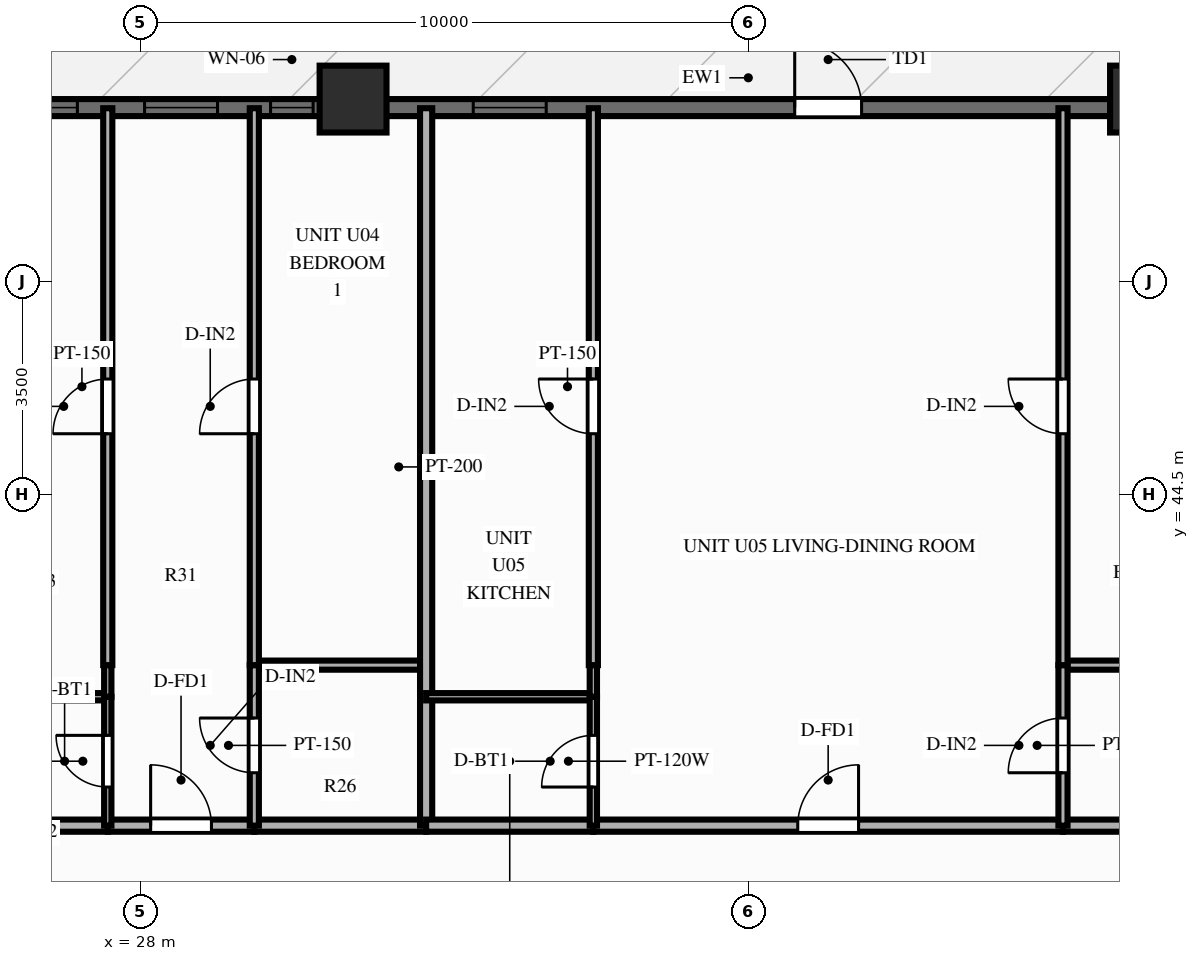
"""IFC4 building model, lengths in metres.
Left out: names, types, materials, properties, quantities, classifications, styles, units other than length and angle.
Written with IfcOpenShell. Run it as: python <this file> out.ifc"""

import sys

from ifc_helpers import new_model, si_unit, direction, frame, frame_2d, origin, origin_2d, place, context, subcontext, project, spatial, rectangle, extrude, source, transform, mapped, element, fill, save


model = new_model("IFC4")
c1 = context("Model", 3, precision=1e-05, world=origin(), true_north=direction((0.0, 1.0)))
c2 = subcontext(c1, "Body", "Model", "MODEL_VIEW")
j1 = project(units=[si_unit("LENGTHUNIT", "METRE"), si_unit("PLANEANGLEUNIT", "RADIAN")], contexts=[c1])
p1 = place(None, origin())
s1 = spatial("IfcSite", under=j1, at=p1, CompositionType="ELEMENT")
p2 = place(p1, origin())
s2 = spatial("IfcBuilding", under=s1, at=p2, CompositionType="ELEMENT")
p3 = place(p2, frame((0.0, 0.0, 46.4)))
s3 = spatial("IfcBuildingStorey", under=s2, at=p3, CompositionType="ELEMENT", Elevation=46.4)
m1 = source(origin(), c2, "Body", "SweptSolid", [
    extrude(rectangle(XDim=1.1, YDim=1.1, at=origin_2d()), origin(), (0.0, 0.0, 1.0), 3.0),
])
for number, where, z_axis, x_axis in (
    (1, (44.5, 51.0, 0.0), (0.0, 0.0, 1.0), (1.0, 0.0, 0.0)),
    (2, (31.5, 51.0, 0.0), (0.0, 0.0, 1.0), (1.0, 0.0, 0.0)),
):
    element("IfcColumn", number, at=place(p3, frame(where, z_axis=z_axis, x_axis=x_axis)), inside=s3, PredefinedType="COLUMN", context=c2, shape_type="MappedRepresentation", body=[
        mapped(m1, transform((0.0, 0.0, 0.0), scale=1.0)),
    ])
p4 = place(p3, frame((15.5, 50.86, 0.0), z_axis=(0.0, 0.0, 1.0), x_axis=(1.0, 0.0, 0.0)))
e3 = element("IfcWall", 3, at=p4, inside=s3, PredefinedType="SOLIDWALL", context=c2, shape_type="SweptSolid", body=[
    extrude(rectangle(XDim=45.0, YDim=0.28, at=frame_2d((22.5, 0.0))), origin(), (0.0, 0.0, 1.0), 2.28),
])
p5 = place(p4, frame((0.76, 0.0, 0.25)))
e4 = element("IfcOpeningElement", 4, at=p5, cuts=e3, PredefinedType="OPENING", context=c2, shape_type="SweptSolid", body=[
    extrude(rectangle(XDim=1.2, YDim=1.5, at=frame_2d((0.6, 0.75))), frame((0.0, 0.152, 0.0), z_axis=(0.0, -1.0, 0.0), x_axis=(1.0, 0.0, 0.0)), (0.0, 0.0, 1.0), 0.304),
])
p6 = place(p4, frame((2.83, 0.0, 0.25)))
e5 = element("IfcOpeningElement", 5, at=p6, cuts=e3, PredefinedType="OPENING", context=c2, shape_type="SweptSolid", body=[
    extrude(rectangle(XDim=1.2, YDim=1.5, at=frame_2d((0.6, 0.75))), frame((0.0, 0.152, 0.0), z_axis=(0.0, -1.0, 0.0), x_axis=(1.0, 0.0, 0.0)), (0.0, 0.0, 1.0), 0.304),
])
p7 = place(p4, frame((5.135, 0.0, 0.25)))
e6 = element("IfcOpeningElement", 6, at=p7, cuts=e3, PredefinedType="OPENING", context=c2, shape_type="SweptSolid", body=[
    extrude(rectangle(XDim=1.2, YDim=1.5, at=frame_2d((0.6, 0.75))), frame((0.0, 0.152, 0.0), z_axis=(0.0, -1.0, 0.0), x_axis=(1.0, 0.0, 0.0)), (0.0, 0.0, 1.0), 0.304),
])
p8 = place(p4, frame((7.753, 0.0, 0.25)))
e7 = element("IfcOpeningElement", 7, at=p8, cuts=e3, PredefinedType="OPENING", context=c2, shape_type="SweptSolid", body=[
    extrude(rectangle(XDim=1.2, YDim=1.5, at=frame_2d((0.6, 0.75))), frame((0.0, 0.152, 0.0), z_axis=(0.0, -1.0, 0.0), x_axis=(1.0, 0.0, 0.0)), (0.0, 0.0, 1.0), 0.304),
])
p9 = place(p4, frame((10.266, 0.0, 0.25)))
e8 = element("IfcOpeningElement", 8, at=p9, cuts=e3, PredefinedType="OPENING", context=c2, shape_type="SweptSolid", body=[
    extrude(rectangle(XDim=1.2, YDim=1.5, at=frame_2d((0.6, 0.75))), frame((0.0, 0.152, 0.0), z_axis=(0.0, -1.0, 0.0), x_axis=(1.0, 0.0, 0.0)), (0.0, 0.0, 1.0), 0.304),
])
p10 = place(p4, frame((12.571, 0.0, 0.25)))
e9 = element("IfcOpeningElement", 9, at=p10, cuts=e3, PredefinedType="OPENING", context=c2, shape_type="SweptSolid", body=[
    extrude(rectangle(XDim=1.2, YDim=1.5, at=frame_2d((0.6, 0.75))), frame((0.0, 0.152, 0.0), z_axis=(0.0, -1.0, 0.0), x_axis=(1.0, 0.0, 0.0)), (0.0, 0.0, 1.0), 0.304),
])
p11 = place(p4, frame((14.643, 0.0, 0.25)))
e10 = element("IfcOpeningElement", 10, at=p11, cuts=e3, PredefinedType="OPENING", context=c2, shape_type="SweptSolid", body=[
    extrude(rectangle(XDim=0.7, YDim=1.5, at=frame_2d((0.35, 0.75))), frame((0.0, 0.152, 0.0), z_axis=(0.0, -1.0, 0.0), x_axis=(1.0, 0.0, 0.0)), (0.0, 0.0, 1.0), 0.304),
])
p12 = place(p4, frame((17.977, 0.0, 0.25)))
e11 = element("IfcOpeningElement", 11, at=p12, cuts=e3, PredefinedType="OPENING", context=c2, shape_type="SweptSolid", body=[
    extrude(rectangle(XDim=1.2, YDim=1.5, at=frame_2d((0.6, 0.75))), frame((0.0, 0.152, 0.0), z_axis=(0.0, -1.0, 0.0), x_axis=(1.0, 0.0, 0.0)), (0.0, 0.0, 1.0), 0.304),
])
p13 = place(p4, frame((23.263, 0.0, 0.0)))
e12 = element("IfcOpeningElement", 12, at=p13, cuts=e3, PredefinedType="OPENING", context=c2, shape_type="SweptSolid", body=[
    extrude(rectangle(XDim=1.1, YDim=2.15, at=frame_2d((0.55, 1.075))), frame((0.0, 0.152, 0.0), z_axis=(0.0, -1.0, 0.0), x_axis=(1.0, 0.0, 0.0)), (0.0, 0.0, 1.0), 0.304),
])
p14 = place(p4, frame((29.832, 0.0, 0.25)))
e13 = element("IfcOpeningElement", 13, at=p14, cuts=e3, PredefinedType="OPENING", context=c2, shape_type="SweptSolid", body=[
    extrude(rectangle(XDim=0.95, YDim=1.5, at=frame_2d((0.475, 0.75))), frame((0.0, 0.152, 0.0), z_axis=(0.0, -1.0, 0.0), x_axis=(1.0, 0.0, 0.0)), (0.0, 0.0, 1.0), 0.304),
])
p15 = place(p4, frame((31.998, 0.0, 0.25)))
e14 = element("IfcOpeningElement", 14, at=p15, cuts=e3, PredefinedType="OPENING", context=c2, shape_type="SweptSolid", body=[
    extrude(rectangle(XDim=1.2, YDim=1.5, at=frame_2d((0.6, 0.75))), frame((0.0, 0.152, 0.0), z_axis=(0.0, -1.0, 0.0), x_axis=(1.0, 0.0, 0.0)), (0.0, 0.0, 1.0), 0.304),
])
p16 = place(p4, frame((37.023, 0.0, 0.25)))
e15 = element("IfcOpeningElement", 15, at=p16, cuts=e3, PredefinedType="OPENING", context=c2, shape_type="SweptSolid", body=[
    extrude(rectangle(XDim=1.2, YDim=1.5, at=frame_2d((0.6, 0.75))), frame((0.0, 0.152, 0.0), z_axis=(0.0, -1.0, 0.0), x_axis=(1.0, 0.0, 0.0)), (0.0, 0.0, 1.0), 0.304),
])
p17 = place(p4, frame((42.341, 0.0, 0.25)))
e16 = element("IfcOpeningElement", 16, at=p17, cuts=e3, PredefinedType="OPENING", context=c2, shape_type="SweptSolid", body=[
    extrude(rectangle(XDim=1.2, YDim=1.5, at=frame_2d((0.6, 0.75))), frame((0.0, 0.152, 0.0), z_axis=(0.0, -1.0, 0.0), x_axis=(1.0, 0.0, 0.0)), (0.0, 0.0, 1.0), 0.304),
])
p18 = place(p3, frame((25.266, 39.05, 0.0), z_axis=(0.0, 0.0, 1.0), x_axis=(1.0, 0.0, 0.0)))
e17 = element("IfcWall", 17, at=p18, inside=s3, PredefinedType="PARTITIONING", context=c2, shape_type="SweptSolid", body=[
    extrude(rectangle(XDim=2.2, YDim=0.2, at=frame_2d((1.1, 0.0))), origin(), (0.0, 0.0, 1.0), 2.79),
])
p19 = place(p3, frame((27.466, 39.05, 0.0), z_axis=(0.0, 0.0, 1.0), x_axis=(1.0, 0.0, 0.0)))
e18 = element("IfcWall", 18, at=p19, inside=s3, PredefinedType="PARTITIONING", context=c2, shape_type="SweptSolid", body=[
    extrude(rectangle(XDim=2.41, YDim=0.2, at=frame_2d((1.205, 0.0))), origin(), (0.0, 0.0, 1.0), 2.79),
])
p20 = place(p19, frame((0.705, 0.0, 0.0)))
e19 = element("IfcOpeningElement", 19, at=p20, cuts=e18, PredefinedType="OPENING", context=c2, shape_type="SweptSolid", body=[
    extrude(rectangle(XDim=1.0, YDim=2.15, at=frame_2d((0.5, 1.075))), frame((0.0, 0.112, 0.0), z_axis=(0.0, -1.0, 0.0), x_axis=(1.0, 0.0, 0.0)), (0.0, 0.0, 1.0), 0.224),
])
p21 = place(p3, frame((29.876, 39.05, 0.0), z_axis=(0.0, 0.0, 1.0), x_axis=(1.0, 0.0, 0.0)))
e20 = element("IfcWall", 20, at=p21, inside=s3, PredefinedType="PARTITIONING", context=c2, shape_type="SweptSolid", body=[
    extrude(rectangle(XDim=2.825, YDim=0.2, at=frame_2d((1.413, 0.0))), origin(), (0.0, 0.0, 1.0), 2.79),
])
p22 = place(p3, frame((25.266, 41.17, 0.0), z_axis=(0.0, 0.0, 1.0), x_axis=(1.0, 0.0, 0.0)))
e21 = element("IfcWall", 21, at=p22, inside=s3, PredefinedType="PARTITIONING", context=c2, shape_type="SweptSolid", body=[
    extrude(rectangle(XDim=2.2, YDim=0.12, at=frame_2d((1.1, 0.0))), origin(), (0.0, 0.0, 1.0), 2.79),
])
p23 = place(p3, frame((29.876, 41.69, 0.0), z_axis=(0.0, 0.0, 1.0), x_axis=(1.0, 0.0, 0.0)))
e22 = element("IfcWall", 22, at=p23, inside=s3, PredefinedType="PARTITIONING", context=c2, shape_type="SweptSolid", body=[
    extrude(rectangle(XDim=2.825, YDim=0.15, at=frame_2d((1.413, 0.0))), origin(), (0.0, 0.0, 1.0), 2.79),
])
p24 = place(p3, frame((27.466, 39.05, 0.0), z_axis=(0.0, 0.0, 1.0), x_axis=(0.0, 1.0, 0.0)))
e23 = element("IfcWall", 23, at=p24, inside=s3, PredefinedType="PARTITIONING", context=c2, shape_type="SweptSolid", body=[
    extrude(rectangle(XDim=2.12, YDim=0.12, at=frame_2d((1.06, 0.0))), origin(), (0.0, 0.0, 1.0), 2.79),
])
p25 = place(p24, frame((0.635, 0.0, 0.0)))
e24 = element("IfcOpeningElement", 24, at=p25, cuts=e23, PredefinedType="OPENING", context=c2, shape_type="SweptSolid", body=[
    extrude(rectangle(XDim=0.85, YDim=2.05, at=frame_2d((0.425, 1.025))), frame((0.0, 0.072, 0.0), z_axis=(0.0, -1.0, 0.0), x_axis=(1.0, 0.0, 0.0)), (0.0, 0.0, 1.0), 0.144),
])
p26 = place(p3, frame((27.466, 41.17, 0.0), z_axis=(0.0, 0.0, 1.0), x_axis=(0.0, 1.0, 0.0)))
e25 = element("IfcWall", 25, at=p26, inside=s3, PredefinedType="PARTITIONING", context=c2, shape_type="SweptSolid", body=[
    extrude(rectangle(XDim=0.52, YDim=0.12, at=frame_2d((0.26, 0.0))), origin(), (0.0, 0.0, 1.0), 2.79),
])
p27 = place(p3, frame((27.466, 41.69, 0.0), z_axis=(0.0, 0.0, 1.0), x_axis=(0.0, 1.0, 0.0)))
e26 = element("IfcWall", 26, at=p27, inside=s3, PredefinedType="PARTITIONING", context=c2, shape_type="SweptSolid", body=[
    extrude(rectangle(XDim=9.16, YDim=0.15, at=frame_2d((4.58, 0.0))), origin(), (0.0, 0.0, 1.0), 2.79),
])
p28 = place(p27, frame((3.806, 0.0, 0.0)))
e27 = element("IfcOpeningElement", 27, at=p28, cuts=e26, PredefinedType="OPENING", context=c2, shape_type="SweptSolid", body=[
    extrude(rectangle(XDim=0.9, YDim=2.1, at=frame_2d((0.45, 1.05))), frame((0.0, 0.087, 0.0), z_axis=(0.0, -1.0, 0.0), x_axis=(1.0, 0.0, 0.0)), (0.0, 0.0, 1.0), 0.174),
])
p29 = place(p3, frame((29.876, 39.05, 0.0), z_axis=(0.0, 0.0, 1.0), x_axis=(0.0, 1.0, 0.0)))
e28 = element("IfcWall", 28, at=p29, inside=s3, PredefinedType="PARTITIONING", context=c2, shape_type="SweptSolid", body=[
    extrude(rectangle(XDim=2.64, YDim=0.15, at=frame_2d((1.32, 0.0))), origin(), (0.0, 0.0, 1.0), 2.79),
])
p30 = place(p29, frame((0.87, 0.0, 0.0)))
e29 = element("IfcOpeningElement", 29, at=p30, cuts=e28, PredefinedType="OPENING", context=c2, shape_type="SweptSolid", body=[
    extrude(rectangle(XDim=0.9, YDim=2.1, at=frame_2d((0.45, 1.05))), frame((0.0, 0.087, 0.0), z_axis=(0.0, -1.0, 0.0), x_axis=(1.0, 0.0, 0.0)), (0.0, 0.0, 1.0), 0.174),
])
p31 = place(p3, frame((29.876, 41.69, 0.0), z_axis=(0.0, 0.0, 1.0), x_axis=(0.0, 1.0, 0.0)))
e30 = element("IfcWall", 30, at=p31, inside=s3, PredefinedType="PARTITIONING", context=c2, shape_type="SweptSolid", body=[
    extrude(rectangle(XDim=9.16, YDim=0.15, at=frame_2d((4.58, 0.0))), origin(), (0.0, 0.0, 1.0), 2.79),
])
p32 = place(p31, frame((3.806, 0.0, 0.0)))
e31 = element("IfcOpeningElement", 31, at=p32, cuts=e30, PredefinedType="OPENING", context=c2, shape_type="SweptSolid", body=[
    extrude(rectangle(XDim=0.9, YDim=2.1, at=frame_2d((0.45, 1.05))), frame((0.0, 0.087, 0.0), z_axis=(0.0, -1.0, 0.0), x_axis=(1.0, 0.0, 0.0)), (0.0, 0.0, 1.0), 0.174),
])
p33 = place(p3, frame((32.701, 39.05, 0.0), z_axis=(0.0, 0.0, 1.0), x_axis=(0.0, 1.0, 0.0)))
e32 = element("IfcWall", 32, at=p33, inside=s3, PredefinedType="PARTITIONING", context=c2, shape_type="SweptSolid", body=[
    extrude(rectangle(XDim=11.8, YDim=0.2, at=frame_2d((5.9, 0.0))), origin(), (0.0, 0.0, 1.0), 2.79),
])
p34 = place(p3, frame((32.701, 39.05, 0.0), z_axis=(0.0, 0.0, 1.0), x_axis=(1.0, 0.0, 0.0)))
e33 = element("IfcWall", 33, at=p34, inside=s3, PredefinedType="PARTITIONING", context=c2, shape_type="SweptSolid", body=[
    extrude(rectangle(XDim=2.75, YDim=0.2, at=frame_2d((1.375, 0.0))), origin(), (0.0, 0.0, 1.0), 2.79),
])
p35 = place(p3, frame((35.451, 39.05, 0.0), z_axis=(0.0, 0.0, 1.0), x_axis=(1.0, 0.0, 0.0)))
e34 = element("IfcWall", 34, at=p35, inside=s3, PredefinedType="PARTITIONING", context=c2, shape_type="SweptSolid", body=[
    extrude(rectangle(XDim=7.724, YDim=0.2, at=frame_2d((3.862, 0.0))), origin(), (0.0, 0.0, 1.0), 2.79),
])
p36 = place(p35, frame((3.362, 0.0, 0.0)))
e35 = element("IfcOpeningElement", 35, at=p36, cuts=e34, PredefinedType="OPENING", context=c2, shape_type="SweptSolid", body=[
    extrude(rectangle(XDim=1.0, YDim=2.15, at=frame_2d((0.5, 1.075))), frame((0.0, 0.112, 0.0), z_axis=(0.0, -1.0, 0.0), x_axis=(1.0, 0.0, 0.0)), (0.0, 0.0, 1.0), 0.224),
])
p37 = place(p3, frame((43.175, 39.05, 0.0), z_axis=(0.0, 0.0, 1.0), x_axis=(1.0, 0.0, 0.0)))
e36 = element("IfcWall", 36, at=p37, inside=s3, PredefinedType="PARTITIONING", context=c2, shape_type="SweptSolid", body=[
    extrude(rectangle(XDim=3.548, YDim=0.2, at=frame_2d((1.774, 0.0))), origin(), (0.0, 0.0, 1.0), 2.79),
])
p38 = place(p3, frame((32.701, 41.17, 0.0), z_axis=(0.0, 0.0, 1.0), x_axis=(1.0, 0.0, 0.0)))
e37 = element("IfcWall", 37, at=p38, inside=s3, PredefinedType="PARTITIONING", context=c2, shape_type="SweptSolid", body=[
    extrude(rectangle(XDim=2.75, YDim=0.12, at=frame_2d((1.375, 0.0))), origin(), (0.0, 0.0, 1.0), 2.79),
])
p39 = place(p3, frame((43.175, 41.69, 0.0), z_axis=(0.0, 0.0, 1.0), x_axis=(1.0, 0.0, 0.0)))
e38 = element("IfcWall", 38, at=p39, inside=s3, PredefinedType="PARTITIONING", context=c2, shape_type="SweptSolid", body=[
    extrude(rectangle(XDim=3.548, YDim=0.15, at=frame_2d((1.774, 0.0))), origin(), (0.0, 0.0, 1.0), 2.79),
])
p40 = place(p3, frame((35.451, 39.05, 0.0), z_axis=(0.0, 0.0, 1.0), x_axis=(0.0, 1.0, 0.0)))
e39 = element("IfcWall", 39, at=p40, inside=s3, PredefinedType="PARTITIONING", context=c2, shape_type="SweptSolid", body=[
    extrude(rectangle(XDim=2.12, YDim=0.12, at=frame_2d((1.06, 0.0))), origin(), (0.0, 0.0, 1.0), 2.79),
])
p41 = place(p40, frame((0.635, 0.0, 0.0)))
e40 = element("IfcOpeningElement", 40, at=p41, cuts=e39, PredefinedType="OPENING", context=c2, shape_type="SweptSolid", body=[
    extrude(rectangle(XDim=0.85, YDim=2.05, at=frame_2d((0.425, 1.025))), frame((0.0, 0.072, 0.0), z_axis=(0.0, -1.0, 0.0), x_axis=(1.0, 0.0, 0.0)), (0.0, 0.0, 1.0), 0.144),
])
p42 = place(p3, frame((35.451, 41.17, 0.0), z_axis=(0.0, 0.0, 1.0), x_axis=(0.0, 1.0, 0.0)))
e41 = element("IfcWall", 41, at=p42, inside=s3, PredefinedType="PARTITIONING", context=c2, shape_type="SweptSolid", body=[
    extrude(rectangle(XDim=0.52, YDim=0.12, at=frame_2d((0.26, 0.0))), origin(), (0.0, 0.0, 1.0), 2.79),
])
p43 = place(p3, frame((35.451, 41.69, 0.0), z_axis=(0.0, 0.0, 1.0), x_axis=(0.0, 1.0, 0.0)))
e42 = element("IfcWall", 42, at=p43, inside=s3, PredefinedType="PARTITIONING", context=c2, shape_type="SweptSolid", body=[
    extrude(rectangle(XDim=9.16, YDim=0.15, at=frame_2d((4.58, 0.0))), origin(), (0.0, 0.0, 1.0), 2.79),
])
p44 = place(p43, frame((3.806, 0.0, 0.0)))
e43 = element("IfcOpeningElement", 43, at=p44, cuts=e42, PredefinedType="OPENING", context=c2, shape_type="SweptSolid", body=[
    extrude(rectangle(XDim=0.9, YDim=2.1, at=frame_2d((0.45, 1.05))), frame((0.0, 0.087, 0.0), z_axis=(0.0, -1.0, 0.0), x_axis=(1.0, 0.0, 0.0)), (0.0, 0.0, 1.0), 0.174),
])
p45 = place(p3, frame((43.175, 39.05, 0.0), z_axis=(0.0, 0.0, 1.0), x_axis=(0.0, 1.0, 0.0)))
e44 = element("IfcWall", 44, at=p45, inside=s3, PredefinedType="PARTITIONING", context=c2, shape_type="SweptSolid", body=[
    extrude(rectangle(XDim=2.64, YDim=0.15, at=frame_2d((1.32, 0.0))), origin(), (0.0, 0.0, 1.0), 2.79),
])
p46 = place(p45, frame((0.87, 0.0, 0.0)))
e45 = element("IfcOpeningElement", 45, at=p46, cuts=e44, PredefinedType="OPENING", context=c2, shape_type="SweptSolid", body=[
    extrude(rectangle(XDim=0.9, YDim=2.1, at=frame_2d((0.45, 1.05))), frame((0.0, 0.087, 0.0), z_axis=(0.0, -1.0, 0.0), x_axis=(1.0, 0.0, 0.0)), (0.0, 0.0, 1.0), 0.174),
])
p47 = place(p3, frame((43.175, 41.69, 0.0), z_axis=(0.0, 0.0, 1.0), x_axis=(0.0, 1.0, 0.0)))
e46 = element("IfcWall", 46, at=p47, inside=s3, PredefinedType="PARTITIONING", context=c2, shape_type="SweptSolid", body=[
    extrude(rectangle(XDim=9.16, YDim=0.15, at=frame_2d((4.58, 0.0))), origin(), (0.0, 0.0, 1.0), 2.79),
])
p48 = place(p47, frame((3.806, 0.0, 0.0)))
e47 = element("IfcOpeningElement", 47, at=p48, cuts=e46, PredefinedType="OPENING", context=c2, shape_type="SweptSolid", body=[
    extrude(rectangle(XDim=0.9, YDim=2.1, at=frame_2d((0.45, 1.05))), frame((0.0, 0.087, 0.0), z_axis=(0.0, -1.0, 0.0), x_axis=(1.0, 0.0, 0.0)), (0.0, 0.0, 1.0), 0.174),
])
m2 = source(origin(), c2, "Body", "SweptSolid", [
    extrude(rectangle(XDim=1.2, YDim=1.5, at=frame_2d((0.6, 0.75))), frame((0.0, 0.03, 0.0), z_axis=(0.0, -1.0, 0.0), x_axis=(1.0, 0.0, 0.0)), (0.0, 0.0, 1.0), 0.06),
])
p49 = place(p9, origin())
e48 = element("IfcWindow", 48, at=p49, inside=s3, PartitioningType="SINGLE_PANEL", PredefinedType="WINDOW", context=c2, shape_type="MappedRepresentation", body=[
    mapped(m2, transform((0.0, 0.0, 0.0), scale=1.0)),
])
fill(e8, e48)
p50 = place(p10, origin())
e49 = element("IfcWindow", 49, at=p50, inside=s3, PartitioningType="SINGLE_PANEL", PredefinedType="WINDOW", context=c2, shape_type="MappedRepresentation", body=[
    mapped(m2, transform((0.0, 0.0, 0.0), scale=1.0)),
])
fill(e9, e49)
m3 = source(origin(), c2, "Body", "SweptSolid", [
    extrude(rectangle(XDim=0.7, YDim=1.5, at=frame_2d((0.35, 0.75))), frame((0.0, 0.03, 0.0), z_axis=(0.0, -1.0, 0.0), x_axis=(1.0, 0.0, 0.0)), (0.0, 0.0, 1.0), 0.06),
])
p51 = place(p11, origin())
e50 = element("IfcWindow", 50, at=p51, inside=s3, PartitioningType="SINGLE_PANEL", PredefinedType="WINDOW", context=c2, shape_type="MappedRepresentation", body=[
    mapped(m3, transform((0.0, 0.0, 0.0), scale=1.0)),
])
fill(e10, e50)
p52 = place(p12, origin())
e51 = element("IfcWindow", 51, at=p52, inside=s3, PartitioningType="SINGLE_PANEL", PredefinedType="WINDOW", context=c2, shape_type="MappedRepresentation", body=[
    mapped(m2, transform((0.0, 0.0, 0.0), scale=1.0)),
])
fill(e11, e51)
m4 = source(origin(), c2, "Body", "SweptSolid", [
    extrude(rectangle(XDim=1.1, YDim=2.15, at=frame_2d((0.55, 1.075))), frame((0.0, 0.025, 0.0), z_axis=(0.0, -1.0, 0.0), x_axis=(1.0, 0.0, 0.0)), (0.0, 0.0, 1.0), 0.05),
])
p53 = place(p13, origin())
e52 = element("IfcDoor", 52, at=p53, inside=s3, OperationType="SINGLE_SWING_LEFT", PredefinedType="DOOR", context=c2, shape_type="MappedRepresentation", body=[
    mapped(m4, transform((0.0, 0.0, 0.0), scale=1.0)),
])
fill(e12, e52)
m5 = source(origin(), c2, "Body", "SweptSolid", [
    extrude(rectangle(XDim=1.0, YDim=2.15, at=frame_2d((0.5, 1.075))), frame((0.0, 0.025, 0.0), z_axis=(0.0, -1.0, 0.0), x_axis=(1.0, 0.0, 0.0)), (0.0, 0.0, 1.0), 0.05),
])
p54 = place(p20, origin())
e53 = element("IfcDoor", 53, at=p54, inside=s3, OperationType="SINGLE_SWING_LEFT", PredefinedType="DOOR", context=c2, shape_type="MappedRepresentation", body=[
    mapped(m5, transform((0.0, 0.0, 0.0), scale=1.0)),
])
fill(e19, e53)
m6 = source(origin(), c2, "Body", "SweptSolid", [
    extrude(rectangle(XDim=0.85, YDim=2.05, at=frame_2d((0.425, 1.025))), frame((0.0, 0.025, 0.0), z_axis=(0.0, -1.0, 0.0), x_axis=(1.0, 0.0, 0.0)), (0.0, 0.0, 1.0), 0.05),
])
p55 = place(p25, origin())
e54 = element("IfcDoor", 54, at=p55, inside=s3, OperationType="SINGLE_SWING_RIGHT", PredefinedType="DOOR", context=c2, shape_type="MappedRepresentation", body=[
    mapped(m6, transform((0.0, 0.0, 0.0), scale=1.0)),
])
fill(e24, e54)
m7 = source(origin(), c2, "Body", "SweptSolid", [
    extrude(rectangle(XDim=0.9, YDim=2.1, at=frame_2d((0.45, 1.05))), frame((0.0, 0.025, 0.0), z_axis=(0.0, -1.0, 0.0), x_axis=(1.0, 0.0, 0.0)), (0.0, 0.0, 1.0), 0.05),
])
p56 = place(p28, origin())
e55 = element("IfcDoor", 55, at=p56, inside=s3, OperationType="SINGLE_SWING_LEFT", PredefinedType="DOOR", context=c2, shape_type="MappedRepresentation", body=[
    mapped(m7, transform((0.0, 0.0, 0.0), scale=1.0)),
])
fill(e27, e55)
p57 = place(p30, origin())
e56 = element("IfcDoor", 56, at=p57, inside=s3, OperationType="SINGLE_SWING_RIGHT", PredefinedType="DOOR", context=c2, shape_type="MappedRepresentation", body=[
    mapped(m7, transform((0.0, 0.0, 0.0), scale=1.0)),
])
fill(e29, e56)
p58 = place(p32, origin())
e57 = element("IfcDoor", 57, at=p58, inside=s3, OperationType="SINGLE_SWING_LEFT", PredefinedType="DOOR", context=c2, shape_type="MappedRepresentation", body=[
    mapped(m7, transform((0.0, 0.0, 0.0), scale=1.0)),
])
fill(e31, e57)
p59 = place(p36, origin())
e58 = element("IfcDoor", 58, at=p59, inside=s3, OperationType="SINGLE_SWING_RIGHT", PredefinedType="DOOR", context=c2, shape_type="MappedRepresentation", body=[
    mapped(m5, transform((0.0, 0.0, 0.0), scale=1.0)),
])
fill(e35, e58)
p60 = place(p41, origin())
e59 = element("IfcDoor", 59, at=p60, inside=s3, OperationType="SINGLE_SWING_LEFT", PredefinedType="DOOR", context=c2, shape_type="MappedRepresentation", body=[
    mapped(m6, transform((0.0, 0.0, 0.0), scale=1.0)),
])
fill(e40, e59)
p61 = place(p44, origin())
e60 = element("IfcDoor", 60, at=p61, inside=s3, OperationType="SINGLE_SWING_RIGHT", PredefinedType="DOOR", context=c2, shape_type="MappedRepresentation", body=[
    mapped(m7, transform((0.0, 0.0, 0.0), scale=1.0)),
])
fill(e43, e60)
p62 = place(p46, origin())
e61 = element("IfcDoor", 61, at=p62, inside=s3, OperationType="SINGLE_SWING_LEFT", PredefinedType="DOOR", context=c2, shape_type="MappedRepresentation", body=[
    mapped(m7, transform((0.0, 0.0, 0.0), scale=1.0)),
])
fill(e45, e61)
p63 = place(p48, origin())
e62 = element("IfcDoor", 62, at=p63, inside=s3, OperationType="SINGLE_SWING_RIGHT", PredefinedType="DOOR", context=c2, shape_type="MappedRepresentation", body=[
    mapped(m7, transform((0.0, 0.0, 0.0), scale=1.0)),
])
fill(e47, e62)
save(model, sys.argv[1])
